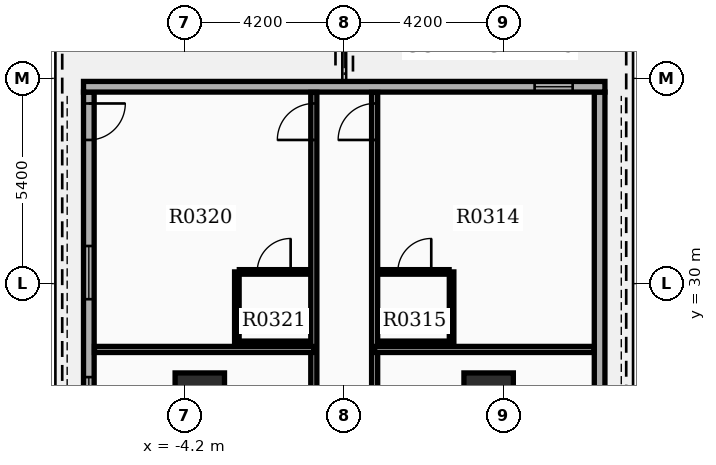
"""IFC4 building model, lengths in metres.
Left out: names, types, materials, properties, quantities, classifications, styles, units other than length and angle.
Written with IfcOpenShell. Run it as: python <this file> out.ifc"""

import sys

from ifc_helpers import new_model, si_unit, direction, frame, frame_2d, origin, origin_2d, place, context, subcontext, project, spatial, rectangle, extrude, element, fill, save


model = new_model("IFC4")
c1 = context("Model", 3, precision=1e-05, world=origin(), true_north=direction((0.0, 1.0)))
c2 = subcontext(c1, "Body", "Model", "MODEL_VIEW")
j1 = project(units=[si_unit("LENGTHUNIT", "METRE"), si_unit("PLANEANGLEUNIT", "RADIAN")], contexts=[c1])
p1 = place(None, origin())
s1 = spatial("IfcSite", under=j1, at=p1, CompositionType="ELEMENT")
p2 = place(p1, origin())
s2 = spatial("IfcBuilding", under=s1, at=p2, CompositionType="ELEMENT")
p3 = place(p2, frame((0.0, 0.0, 23.7)))
s3 = spatial("IfcBuildingStorey", under=s2, at=p3, CompositionType="ELEMENT", Elevation=23.7)
for number, where, z_axis, x_axis in (
    (1, (-3.8, 27.0, 0.0), (0.0, 0.0, 1.0), (1.0, 0.0, 0.0)),
    (2, (3.8, 27.0, 0.0), (0.0, 0.0, 1.0), (1.0, 0.0, 0.0)),
):
    element("IfcColumn", number, at=place(p3, frame(where, z_axis=z_axis, x_axis=x_axis)), inside=s3, PredefinedType="COLUMN", context=c2, shape_type="SweptSolid", body=[
        extrude(rectangle(XDim=1.3, YDim=1.3, at=origin_2d()), origin(), (0.0, 0.0, 1.0), 3.9),
    ])
p4 = place(p3, frame((6.72, 14.94, 0.0), z_axis=(0.0, 0.0, 1.0), x_axis=(0.0, 1.0, 0.0)))
e3 = element("IfcWall", 3, at=p4, inside=s3, PredefinedType="STANDARD", context=c2, shape_type="SweptSolid", body=[
    extrude(rectangle(XDim=20.1, YDim=0.28, at=frame_2d((10.05, 0.0))), origin(), (0.0, 0.0, 1.0), 2.91),
])
p5 = place(p4, frame((0.85, 0.0, 0.8)))
e4 = element("IfcOpeningElement", 4, at=p5, cuts=e3, PredefinedType="OPENING", context=c2, shape_type="SweptSolid", body=[
    extrude(rectangle(XDim=1.4, YDim=1.6, at=frame_2d((0.7, 0.8))), frame((0.0, 0.15, 0.0), z_axis=(0.0, -1.0, 0.0), x_axis=(1.0, 0.0, 0.0)), (0.0, 0.0, 1.0), 0.3),
])
p6 = place(p4, frame((4.05, 0.0, 0.8)))
e5 = element("IfcOpeningElement", 5, at=p6, cuts=e3, PredefinedType="OPENING", context=c2, shape_type="SweptSolid", body=[
    extrude(rectangle(XDim=1.4, YDim=1.6, at=frame_2d((0.7, 0.8))), frame((0.0, 0.15, 0.0), z_axis=(0.0, -1.0, 0.0), x_axis=(1.0, 0.0, 0.0)), (0.0, 0.0, 1.0), 0.3),
])
p7 = place(p4, frame((7.25, 0.0, 0.8)))
e6 = element("IfcOpeningElement", 6, at=p7, cuts=e3, PredefinedType="OPENING", context=c2, shape_type="SweptSolid", body=[
    extrude(rectangle(XDim=1.4, YDim=1.6, at=frame_2d((0.7, 0.8))), frame((0.0, 0.15, 0.0), z_axis=(0.0, -1.0, 0.0), x_axis=(1.0, 0.0, 0.0)), (0.0, 0.0, 1.0), 0.3),
])
p8 = place(p4, frame((10.45, 0.0, 0.8)))
e7 = element("IfcOpeningElement", 7, at=p8, cuts=e3, PredefinedType="OPENING", context=c2, shape_type="SweptSolid", body=[
    extrude(rectangle(XDim=1.4, YDim=1.6, at=frame_2d((0.7, 0.8))), frame((0.0, 0.15, 0.0), z_axis=(0.0, -1.0, 0.0), x_axis=(1.0, 0.0, 0.0)), (0.0, 0.0, 1.0), 0.3),
])
p9 = place(p3, frame((-6.72, 35.04, 0.0), z_axis=(0.0, 0.0, 1.0), x_axis=(0.0, -1.0, 0.0)))
e8 = element("IfcWall", 8, at=p9, inside=s3, PredefinedType="STANDARD", context=c2, shape_type="SweptSolid", body=[
    extrude(rectangle(XDim=20.1, YDim=0.28, at=frame_2d((10.05, 0.0))), origin(), (0.0, 0.0, 1.0), 2.91),
])
p10 = place(p9, frame((4.05, 0.0, 0.8)))
e9 = element("IfcOpeningElement", 9, at=p10, cuts=e8, PredefinedType="OPENING", context=c2, shape_type="SweptSolid", body=[
    extrude(rectangle(XDim=1.4, YDim=1.6, at=frame_2d((0.7, 0.8))), frame((0.0, 0.15, 0.0), z_axis=(0.0, -1.0, 0.0), x_axis=(1.0, 0.0, 0.0)), (0.0, 0.0, 1.0), 0.3),
])
p11 = place(p9, frame((7.5, 0.0, 0.8)))
e10 = element("IfcOpeningElement", 10, at=p11, cuts=e8, PredefinedType="OPENING", context=c2, shape_type="SweptSolid", body=[
    extrude(rectangle(XDim=1.4, YDim=1.6, at=frame_2d((0.7, 0.8))), frame((0.0, 0.15, 0.0), z_axis=(0.0, -1.0, 0.0), x_axis=(1.0, 0.0, 0.0)), (0.0, 0.0, 1.0), 0.3),
])
p12 = place(p9, frame((10.7, 0.0, 0.8)))
e11 = element("IfcOpeningElement", 11, at=p12, cuts=e8, PredefinedType="OPENING", context=c2, shape_type="SweptSolid", body=[
    extrude(rectangle(XDim=1.4, YDim=1.6, at=frame_2d((0.7, 0.8))), frame((0.0, 0.15, 0.0), z_axis=(0.0, -1.0, 0.0), x_axis=(1.0, 0.0, 0.0)), (0.0, 0.0, 1.0), 0.3),
])
p13 = place(p9, frame((0.3, 0.0, 0.0)))
e12 = element("IfcOpeningElement", 12, at=p13, cuts=e8, PredefinedType="OPENING", context=c2, shape_type="SweptSolid", body=[
    extrude(rectangle(XDim=0.96, YDim=2.1, at=frame_2d((0.48, 1.05))), frame((0.0, 0.15, 0.0), z_axis=(0.0, -1.0, 0.0), x_axis=(1.0, 0.0, 0.0)), (0.0, 0.0, 1.0), 0.3),
])
p14 = place(p9, frame((14.799, 0.0, 0.85)))
e13 = element("IfcOpeningElement", 13, at=p14, cuts=e8, PredefinedType="OPENING", context=c2, shape_type="SweptSolid", body=[
    extrude(rectangle(XDim=1.2, YDim=1.6, at=frame_2d((0.6, 0.8))), frame((0.0, 0.15, 0.0), z_axis=(0.0, -1.0, 0.0), x_axis=(1.0, 0.0, 0.0)), (0.0, 0.0, 1.0), 0.3),
])
p15 = place(p3, frame((6.86, 35.18, 0.0), z_axis=(0.0, 0.0, 1.0), x_axis=(-1.0, 0.0, 0.0)))
e14 = element("IfcWall", 14, at=p15, inside=s3, PredefinedType="STANDARD", context=c2, shape_type="SweptSolid", body=[
    extrude(rectangle(XDim=13.72, YDim=0.28, at=frame_2d((6.86, 0.0))), origin(), (0.0, 0.0, 1.0), 2.91),
])
p16 = place(p15, frame((0.85, 0.0, 0.85)))
e15 = element("IfcOpeningElement", 15, at=p16, cuts=e14, PredefinedType="OPENING", context=c2, shape_type="SweptSolid", body=[
    extrude(rectangle(XDim=1.0, YDim=1.5, at=frame_2d((0.5, 0.75))), frame((0.0, 0.15, 0.0), z_axis=(0.0, -1.0, 0.0), x_axis=(1.0, 0.0, 0.0)), (0.0, 0.0, 1.0), 0.3),
])
p17 = place(p3, frame((0.8, 14.85, 0.0), z_axis=(0.0, 0.0, 1.0), x_axis=(0.0, 1.0, 0.0)))
e16 = element("IfcWall", 16, at=p17, inside=s3, PredefinedType="PARTITIONING", context=c2, shape_type="SweptSolid", body=[
    extrude(rectangle(XDim=20.182, YDim=0.16, at=frame_2d((10.091, 0.0))), origin(), (0.0, 0.0, 1.0), 2.9),
])
p18 = place(p17, frame((2.61, 0.0, 0.0)))
e17 = element("IfcOpeningElement", 17, at=p18, cuts=e16, PredefinedType="OPENING", context=c2, shape_type="SweptSolid", body=[
    extrude(rectangle(XDim=0.96, YDim=2.15, at=frame_2d((0.48, 1.075))), frame((0.0, 0.09, 0.0), z_axis=(0.0, -1.0, 0.0), x_axis=(1.0, 0.0, 0.0)), (0.0, 0.0, 1.0), 0.18),
])
p19 = place(p17, frame((8.994, 0.0, 0.0)))
e18 = element("IfcOpeningElement", 18, at=p19, cuts=e16, PredefinedType="OPENING", context=c2, shape_type="SweptSolid", body=[
    extrude(rectangle(XDim=0.96, YDim=2.15, at=frame_2d((0.48, 1.075))), frame((0.0, 0.09, 0.0), z_axis=(0.0, -1.0, 0.0), x_axis=(1.0, 0.0, 0.0)), (0.0, 0.0, 1.0), 0.18),
])
p20 = place(p17, frame((18.93, 0.0, 0.0)))
e19 = element("IfcOpeningElement", 19, at=p20, cuts=e16, PredefinedType="OPENING", context=c2, shape_type="SweptSolid", body=[
    extrude(rectangle(XDim=0.96, YDim=2.15, at=frame_2d((0.48, 1.075))), frame((0.0, 0.09, 0.0), z_axis=(0.0, -1.0, 0.0), x_axis=(1.0, 0.0, 0.0)), (0.0, 0.0, 1.0), 0.18),
])
p21 = place(p3, frame((0.8, 28.268, 0.0), z_axis=(0.0, 0.0, 1.0), x_axis=(1.0, 0.0, 0.0)))
e20 = element("IfcWall", 20, at=p21, inside=s3, PredefinedType="PARTITIONING", context=c2, shape_type="SweptSolid", body=[
    extrude(rectangle(XDim=5.772, YDim=0.16, at=frame_2d((2.886, 0.0))), origin(), (0.0, 0.0, 1.0), 2.9),
])
p22 = place(p3, frame((0.94, 30.308, 0.0), z_axis=(0.0, 0.0, 1.0), x_axis=(1.0, 0.0, 0.0)))
e21 = element("IfcWall", 21, at=p22, inside=s3, PredefinedType="PARTITIONING", context=c2, shape_type="SweptSolid", body=[
    extrude(rectangle(XDim=1.82, YDim=0.12, at=frame_2d((0.91, 0.0))), origin(), (0.0, 0.0, 1.0), 2.9),
])
p23 = place(p22, frame((0.47, 0.0, 0.0)))
e22 = element("IfcOpeningElement", 22, at=p23, cuts=e21, PredefinedType="OPENING", context=c2, shape_type="SweptSolid", body=[
    extrude(rectangle(XDim=0.88, YDim=2.1, at=frame_2d((0.44, 1.05))), frame((0.0, 0.07, 0.0), z_axis=(0.0, -1.0, 0.0), x_axis=(1.0, 0.0, 0.0)), (0.0, 0.0, 1.0), 0.14),
])
p24 = place(p3, frame((0.94, 28.428, 0.0), z_axis=(0.0, 0.0, 1.0), x_axis=(1.0, 0.0, 0.0)))
e23 = element("IfcWall", 23, at=p24, inside=s3, PredefinedType="PARTITIONING", context=c2, shape_type="SweptSolid", body=[
    extrude(rectangle(XDim=1.82, YDim=0.12, at=frame_2d((0.91, 0.0))), origin(), (0.0, 0.0, 1.0), 2.9),
])
p25 = place(p3, frame((2.825, 28.428, 0.0), z_axis=(0.0, 0.0, 1.0), x_axis=(0.0, 1.0, 0.0)))
e24 = element("IfcWall", 24, at=p25, inside=s3, PredefinedType="PARTITIONING", context=c2, shape_type="SweptSolid", body=[
    extrude(rectangle(XDim=1.88, YDim=0.12, at=frame_2d((0.94, 0.0))), origin(), (0.0, 0.0, 1.0), 2.9),
])
p26 = place(p3, frame((-0.8, 14.85, 0.0), z_axis=(0.0, 0.0, 1.0), x_axis=(0.0, 1.0, 0.0)))
e25 = element("IfcWall", 25, at=p26, inside=s3, PredefinedType="PARTITIONING", context=c2, shape_type="SweptSolid", body=[
    extrude(rectangle(XDim=20.182, YDim=0.16, at=frame_2d((10.091, 0.0))), origin(), (0.0, 0.0, 1.0), 2.9),
])
p27 = place(p26, frame((2.61, 0.0, 0.0)))
e26 = element("IfcOpeningElement", 26, at=p27, cuts=e25, PredefinedType="OPENING", context=c2, shape_type="SweptSolid", body=[
    extrude(rectangle(XDim=0.96, YDim=2.15, at=frame_2d((0.48, 1.075))), frame((0.0, 0.09, 0.0), z_axis=(0.0, -1.0, 0.0), x_axis=(1.0, 0.0, 0.0)), (0.0, 0.0, 1.0), 0.18),
])
p28 = place(p26, frame((8.994, 0.0, 0.0)))
e27 = element("IfcOpeningElement", 27, at=p28, cuts=e25, PredefinedType="OPENING", context=c2, shape_type="SweptSolid", body=[
    extrude(rectangle(XDim=0.96, YDim=2.15, at=frame_2d((0.48, 1.075))), frame((0.0, 0.09, 0.0), z_axis=(0.0, -1.0, 0.0), x_axis=(1.0, 0.0, 0.0)), (0.0, 0.0, 1.0), 0.18),
])
p29 = place(p26, frame((18.93, 0.0, 0.0)))
e28 = element("IfcOpeningElement", 28, at=p29, cuts=e25, PredefinedType="OPENING", context=c2, shape_type="SweptSolid", body=[
    extrude(rectangle(XDim=0.96, YDim=2.15, at=frame_2d((0.48, 1.075))), frame((0.0, 0.09, 0.0), z_axis=(0.0, -1.0, 0.0), x_axis=(1.0, 0.0, 0.0)), (0.0, 0.0, 1.0), 0.18),
])
p30 = place(p3, frame((-0.8, 28.268, 0.0), z_axis=(0.0, 0.0, 1.0), x_axis=(-1.0, 0.0, 0.0)))
e29 = element("IfcWall", 29, at=p30, inside=s3, PredefinedType="PARTITIONING", context=c2, shape_type="SweptSolid", body=[
    extrude(rectangle(XDim=5.772, YDim=0.16, at=frame_2d((2.886, 0.0))), origin(), (0.0, 0.0, 1.0), 2.9),
])
p31 = place(p3, frame((-2.76, 30.308, 0.0), z_axis=(0.0, 0.0, 1.0), x_axis=(1.0, 0.0, 0.0)))
e30 = element("IfcWall", 30, at=p31, inside=s3, PredefinedType="PARTITIONING", context=c2, shape_type="SweptSolid", body=[
    extrude(rectangle(XDim=1.82, YDim=0.12, at=frame_2d((0.91, 0.0))), origin(), (0.0, 0.0, 1.0), 2.9),
])
p32 = place(p31, frame((0.47, 0.0, 0.0)))
e31 = element("IfcOpeningElement", 31, at=p32, cuts=e30, PredefinedType="OPENING", context=c2, shape_type="SweptSolid", body=[
    extrude(rectangle(XDim=0.88, YDim=2.1, at=frame_2d((0.44, 1.05))), frame((0.0, 0.07, 0.0), z_axis=(0.0, -1.0, 0.0), x_axis=(1.0, 0.0, 0.0)), (0.0, 0.0, 1.0), 0.14),
])
p33 = place(p3, frame((-2.76, 28.428, 0.0), z_axis=(0.0, 0.0, 1.0), x_axis=(1.0, 0.0, 0.0)))
e32 = element("IfcWall", 32, at=p33, inside=s3, PredefinedType="PARTITIONING", context=c2, shape_type="SweptSolid", body=[
    extrude(rectangle(XDim=1.82, YDim=0.12, at=frame_2d((0.91, 0.0))), origin(), (0.0, 0.0, 1.0), 2.9),
])
p34 = place(p3, frame((-2.825, 28.428, 0.0), z_axis=(0.0, 0.0, 1.0), x_axis=(0.0, 1.0, 0.0)))
e33 = element("IfcWall", 33, at=p34, inside=s3, PredefinedType="PARTITIONING", context=c2, shape_type="SweptSolid", body=[
    extrude(rectangle(XDim=1.88, YDim=0.12, at=frame_2d((0.94, 0.0))), origin(), (0.0, 0.0, 1.0), 2.9),
])
p35 = place(p10, origin())
e34 = element("IfcWindow", 34, at=p35, inside=s3, PartitioningType="SINGLE_PANEL", PredefinedType="WINDOW", context=c2, shape_type="SweptSolid", body=[
    extrude(rectangle(XDim=1.4, YDim=1.6, at=frame_2d((0.7, 0.8))), frame((0.0, 0.03, 0.0), z_axis=(0.0, -1.0, 0.0), x_axis=(1.0, 0.0, 0.0)), (0.0, 0.0, 1.0), 0.06),
])
fill(e9, e34)
p36 = place(p11, origin())
e35 = element("IfcWindow", 35, at=p36, inside=s3, PartitioningType="SINGLE_PANEL", PredefinedType="WINDOW", context=c2, shape_type="SweptSolid", body=[
    extrude(rectangle(XDim=1.4, YDim=1.6, at=frame_2d((0.7, 0.8))), frame((0.0, 0.03, 0.0), z_axis=(0.0, -1.0, 0.0), x_axis=(1.0, 0.0, 0.0)), (0.0, 0.0, 1.0), 0.06),
])
fill(e10, e35)
p37 = place(p16, origin())
e36 = element("IfcWindow", 36, at=p37, inside=s3, PartitioningType="SINGLE_PANEL", PredefinedType="WINDOW", context=c2, shape_type="SweptSolid", body=[
    extrude(rectangle(XDim=1.0, YDim=1.5, at=frame_2d((0.5, 0.75))), frame((0.0, 0.03, 0.0), z_axis=(0.0, -1.0, 0.0), x_axis=(1.0, 0.0, 0.0)), (0.0, 0.0, 1.0), 0.06),
])
fill(e15, e36)
p38 = place(p13, origin())
e37 = element("IfcDoor", 37, at=p38, inside=s3, OperationType="SINGLE_SWING_LEFT", PredefinedType="DOOR", context=c2, shape_type="SweptSolid", body=[
    extrude(rectangle(XDim=0.96, YDim=2.1, at=frame_2d((0.48, 1.05))), frame((0.0, 0.025, 0.0), z_axis=(0.0, -1.0, 0.0), x_axis=(1.0, 0.0, 0.0)), (0.0, 0.0, 1.0), 0.05),
])
fill(e12, e37)
p39 = place(p20, origin())
e38 = element("IfcDoor", 38, at=p39, inside=s3, OperationType="SINGLE_SWING_LEFT", PredefinedType="DOOR", context=c2, shape_type="SweptSolid", body=[
    extrude(rectangle(XDim=0.96, YDim=2.15, at=frame_2d((0.48, 1.075))), frame((0.0, 0.025, 0.0), z_axis=(0.0, -1.0, 0.0), x_axis=(1.0, 0.0, 0.0)), (0.0, 0.0, 1.0), 0.05),
])
fill(e19, e38)
p40 = place(p23, origin())
e39 = element("IfcDoor", 39, at=p40, inside=s3, OperationType="SINGLE_SWING_RIGHT", PredefinedType="DOOR", context=c2, shape_type="SweptSolid", body=[
    extrude(rectangle(XDim=0.88, YDim=2.1, at=frame_2d((0.44, 1.05))), frame((0.0, 0.025, 0.0), z_axis=(0.0, -1.0, 0.0), x_axis=(1.0, 0.0, 0.0)), (0.0, 0.0, 1.0), 0.05),
])
fill(e22, e39)
p41 = place(p29, origin())
e40 = element("IfcDoor", 40, at=p41, inside=s3, OperationType="SINGLE_SWING_LEFT", PredefinedType="DOOR", context=c2, shape_type="SweptSolid", body=[
    extrude(rectangle(XDim=0.96, YDim=2.15, at=frame_2d((0.48, 1.075))), frame((0.0, 0.025, 0.0), z_axis=(0.0, -1.0, 0.0), x_axis=(1.0, 0.0, 0.0)), (0.0, 0.0, 1.0), 0.05),
])
fill(e28, e40)
p42 = place(p32, origin())
e41 = element("IfcDoor", 41, at=p42, inside=s3, OperationType="SINGLE_SWING_RIGHT", PredefinedType="DOOR", context=c2, shape_type="SweptSolid", body=[
    extrude(rectangle(XDim=0.88, YDim=2.1, at=frame_2d((0.44, 1.05))), frame((0.0, 0.025, 0.0), z_axis=(0.0, -1.0, 0.0), x_axis=(1.0, 0.0, 0.0)), (0.0, 0.0, 1.0), 0.05),
])
fill(e31, e41)
save(model, sys.argv[1])
